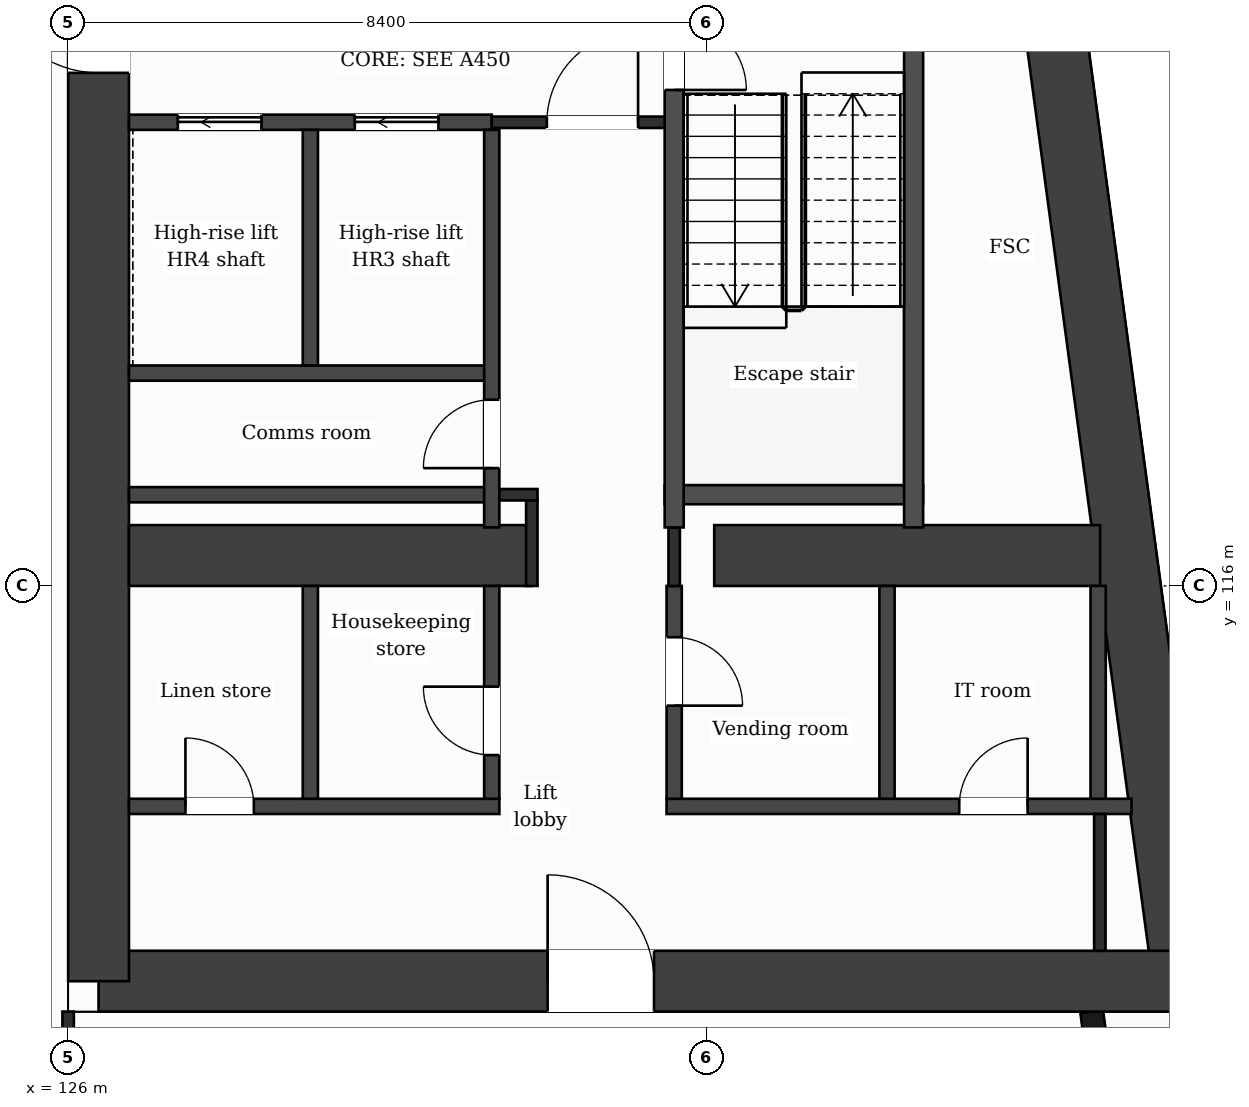
"""IFC4 building model, lengths in metres.
Left out: names, types, materials, properties, quantities, classifications, styles, units other than length and angle.
Written with IfcOpenShell. Run it as: python <this file> out.ifc"""

import sys

from ifc_helpers import new_model, si_unit, direction, frame, frame_2d, origin, place, context, subcontext, project, spatial, rectangle, extrude, element, fill, save


model = new_model("IFC4")
c1 = context("Model", 3, precision=1e-05, world=origin(), true_north=direction((0.0, 1.0)))
c2 = subcontext(c1, "Body", "Model", "MODEL_VIEW")
j1 = project(units=[si_unit("LENGTHUNIT", "METRE"), si_unit("PLANEANGLEUNIT", "RADIAN")], contexts=[c1])
p1 = place(None, origin())
s1 = spatial("IfcSite", under=j1, at=p1, CompositionType="ELEMENT")
p2 = place(p1, origin())
s2 = spatial("IfcBuilding", under=s1, at=p2, CompositionType="ELEMENT")
p3 = place(p2, frame((0.0, 0.0, 205.9)))
s3 = spatial("IfcBuildingStorey", under=s2, at=p3, CompositionType="ELEMENT", Elevation=205.9)
p4 = place(p3, frame((137.82, 132.0, 0.0), z_axis=(0.0, 0.0, 1.0), x_axis=(0.133408347329, -0.991061154956, 0.0)))
e1 = element("IfcWall", 1, at=p4, inside=s3, PredefinedType="SHEAR", context=c2, shape_type="SweptSolid", body=[
    extrude(rectangle(XDim=21.391, YDim=0.8, at=frame_2d((10.696, 0.0))), origin(), (0.0, 0.0, 1.0), 3.7),
])
p5 = place(p3, frame((140.673, 110.8, 0.0), z_axis=(0.0, 0.0, 1.0), x_axis=(-1.0, 0.0, 0.0)))
e2 = element("IfcWall", 2, at=p5, inside=s3, PredefinedType="SHEAR", context=c2, shape_type="SweptSolid", body=[
    extrude(rectangle(XDim=14.273, YDim=0.8, at=frame_2d((7.137, 0.0))), origin(), (0.0, 0.0, 1.0), 3.7),
])
p6 = place(p5, frame((6.965, 0.0, 0.0)))
e3 = element("IfcOpeningElement", 3, at=p6, cuts=e2, PredefinedType="OPENING", context=c2, shape_type="SweptSolid", body=[
    extrude(rectangle(XDim=1.4, YDim=2.1, at=frame_2d((0.7, 1.05))), frame((0.0, 0.41, 0.0), z_axis=(0.0, -1.0, 0.0), x_axis=(1.0, 0.0, 0.0)), (0.0, 0.0, 1.0), 0.82),
])
p7 = place(p3, frame((126.4, 110.8, 0.0), z_axis=(0.0, 0.0, 1.0), x_axis=(0.0, 1.0, 0.0)))
e4 = element("IfcWall", 4, at=p7, inside=s3, PredefinedType="SHEAR", context=c2, shape_type="SweptSolid", body=[
    extrude(rectangle(XDim=21.2, YDim=0.8, at=frame_2d((10.6, 0.0))), origin(), (0.0, 0.0, 1.0), 3.7),
])
p8 = place(p7, frame((11.95, 0.0, 0.0)))
e5 = element("IfcOpeningElement", 5, at=p8, cuts=e4, PredefinedType="OPENING", context=c2, shape_type="SweptSolid", body=[
    extrude(rectangle(XDim=1.4, YDim=2.1, at=frame_2d((0.7, 1.05))), frame((0.0, 0.41, 0.0), z_axis=(0.0, -1.0, 0.0), x_axis=(1.0, 0.0, 0.0)), (0.0, 0.0, 1.0), 0.82),
])
p9 = place(p3, frame((126.8, 116.4, 0.0), z_axis=(0.0, 0.0, 1.0), x_axis=(1.0, 0.0, 0.0)))
e6 = element("IfcWall", 6, at=p9, inside=s3, PredefinedType="SHEAR", context=c2, shape_type="SweptSolid", body=[
    extrude(rectangle(XDim=5.3, YDim=0.8, at=frame_2d((2.65, 0.0))), origin(), (0.0, 0.0, 1.0), 3.7),
])
p10 = place(p3, frame((134.5, 116.4, 0.0), z_axis=(0.0, 0.0, 1.0), x_axis=(1.0, 0.0, 0.0)))
e7 = element("IfcWall", 7, at=p10, inside=s3, PredefinedType="SHEAR", context=c2, shape_type="SweptSolid", body=[
    extrude(rectangle(XDim=5.077, YDim=0.8, at=frame_2d((2.539, 0.0))), origin(), (0.0, 0.0, 1.0), 3.7),
])
p11 = place(p3, frame((140.348, 103.85, 0.0), z_axis=(0.0, 0.0, 1.0), x_axis=(-0.133431549479, 0.991058031401, 0.0)))
e8 = element("IfcWall", 8, at=p11, inside=s3, PredefinedType="SOLIDWALL", context=c2, shape_type="SweptSolid", body=[
    extrude(rectangle(XDim=6.609, YDim=0.3, at=frame_2d((3.304, 0.0))), origin(), (0.0, 0.0, 1.0), 3.38),
])
p12 = place(p11, frame((0.737, 0.0, 0.9)))
e9 = element("IfcOpeningElement", 9, at=p12, cuts=e8, PredefinedType="OPENING", context=c2, shape_type="SweptSolid", body=[
    extrude(rectangle(XDim=1.2, YDim=2.1, at=frame_2d((0.6, 1.05))), frame((0.0, 0.16, 0.0), z_axis=(0.0, -1.0, 0.0), x_axis=(1.0, 0.0, 0.0)), (0.0, 0.0, 1.0), 0.32),
])
p13 = place(p11, frame((3.991, 0.0, 0.0)))
e10 = element("IfcOpeningElement", 10, at=p13, cuts=e8, PredefinedType="OPENING", context=c2, shape_type="SweptSolid", body=[
    extrude(rectangle(XDim=1.2, YDim=2.4, at=frame_2d((0.6, 1.2))), frame((0.0, 0.16, 0.0), z_axis=(0.0, -1.0, 0.0), x_axis=(1.0, 0.0, 0.0)), (0.0, 0.0, 1.0), 0.32),
])
p14 = place(p3, frame((126.8, 113.1, 0.0), z_axis=(0.0, 0.0, 1.0), x_axis=(1.0, 0.0, 0.0)))
e11 = element("IfcWall", 11, at=p14, inside=s3, PredefinedType="PARTITIONING", context=c2, shape_type="SweptSolid", body=[
    extrude(rectangle(XDim=4.873, YDim=0.2, at=frame_2d((2.437, 0.0))), origin(), (0.0, 0.0, 1.0), 3.38),
])
p15 = place(p14, frame((0.743, 0.0, 0.0)))
e12 = element("IfcOpeningElement", 12, at=p15, cuts=e11, PredefinedType="OPENING", context=c2, shape_type="SweptSolid", body=[
    extrude(rectangle(XDim=0.9, YDim=2.1, at=frame_2d((0.45, 1.05))), frame((0.0, 0.11, 0.0), z_axis=(0.0, -1.0, 0.0), x_axis=(1.0, 0.0, 0.0)), (0.0, 0.0, 1.0), 0.22),
])
p16 = place(p3, frame((133.873, 113.1, 0.0), z_axis=(0.0, 0.0, 1.0), x_axis=(1.0, 0.0, 0.0)))
e13 = element("IfcWall", 13, at=p16, inside=s3, PredefinedType="PARTITIONING", context=c2, shape_type="SweptSolid", body=[
    extrude(rectangle(XDim=6.117, YDim=0.2, at=frame_2d((3.059, 0.0))), origin(), (0.0, 0.0, 1.0), 3.38),
])
p17 = place(p16, frame((3.85, 0.0, 0.0)))
e14 = element("IfcOpeningElement", 14, at=p17, cuts=e13, PredefinedType="OPENING", context=c2, shape_type="SweptSolid", body=[
    extrude(rectangle(XDim=0.9, YDim=2.1, at=frame_2d((0.45, 1.05))), frame((0.0, 0.11, 0.0), z_axis=(0.0, -1.0, 0.0), x_axis=(1.0, 0.0, 0.0)), (0.0, 0.0, 1.0), 0.22),
])
p18 = place(p3, frame((126.8, 117.2, 0.0), z_axis=(0.0, 0.0, 1.0), x_axis=(1.0, 0.0, 0.0)))
e15 = element("IfcWall", 15, at=p18, inside=s3, PredefinedType="PARTITIONING", context=c2, shape_type="SweptSolid", body=[
    extrude(rectangle(XDim=4.773, YDim=0.2, at=frame_2d((2.386, 0.0))), origin(), (0.0, 0.0, 1.0), 3.38),
])
p19 = place(p3, frame((131.573, 117.2, 0.0), z_axis=(0.0, 0.0, 1.0), x_axis=(1.0, 0.0, 0.0)))
e16 = element("IfcWall", 16, at=p19, inside=s3, PredefinedType="PARTITIONING", context=c2, shape_type="SweptSolid", body=[
    extrude(rectangle(XDim=0.602, YDim=0.15, at=frame_2d((0.301, 0.0))), origin(), (0.0, 0.0, 1.0), 3.38),
])
p20 = place(p3, frame((133.848, 117.2, 0.0), z_axis=(0.0, 0.0, 1.0), x_axis=(1.0, 0.0, 0.0)))
e17 = element("IfcWall", 17, at=p20, inside=s3, PredefinedType="PARTITIONING", context=c2, shape_type="SweptSolid", body=[
    extrude(rectangle(XDim=3.4, YDim=0.25, at=frame_2d((1.7, 0.0))), origin(), (0.0, 0.0, 1.0), 3.38),
])
p21 = place(p3, frame((126.8, 118.8, 0.0), z_axis=(0.0, 0.0, 1.0), x_axis=(1.0, 0.0, 0.0)))
e18 = element("IfcWall", 18, at=p21, inside=s3, PredefinedType="PARTITIONING", context=c2, shape_type="SweptSolid", body=[
    extrude(rectangle(XDim=4.773, YDim=0.2, at=frame_2d((2.386, 0.0))), origin(), (0.0, 0.0, 1.0), 3.38),
])
p22 = place(p3, frame((126.8, 122.1, 0.0), z_axis=(0.0, 0.0, 1.0), x_axis=(1.0, 0.0, 0.0)))
e19 = element("IfcWall", 19, at=p22, inside=s3, PredefinedType="PARTITIONING", context=c2, shape_type="SweptSolid", body=[
    extrude(rectangle(XDim=4.773, YDim=0.2, at=frame_2d((2.386, 0.0))), origin(), (0.0, 0.0, 1.0), 3.38),
])
p23 = place(p22, frame((2.971, 0.0, 0.0)))
e20 = element("IfcOpeningElement", 20, at=p23, cuts=e19, PredefinedType="OPENING", context=c2, shape_type="SweptSolid", body=[
    extrude(rectangle(XDim=1.1, YDim=2.1, at=frame_2d((0.55, 1.05))), frame((0.0, 0.11, 0.0), z_axis=(0.0, -1.0, 0.0), x_axis=(1.0, 0.0, 0.0)), (0.0, 0.0, 1.0), 0.22),
])
p24 = place(p22, frame((0.643, 0.0, 0.0)))
e21 = element("IfcOpeningElement", 21, at=p24, cuts=e19, PredefinedType="OPENING", context=c2, shape_type="SweptSolid", body=[
    extrude(rectangle(XDim=1.1, YDim=2.1, at=frame_2d((0.55, 1.05))), frame((0.0, 0.11, 0.0), z_axis=(0.0, -1.0, 0.0), x_axis=(1.0, 0.0, 0.0)), (0.0, 0.0, 1.0), 0.22),
])
p25 = place(p3, frame((131.573, 122.1, 0.0), z_axis=(0.0, 0.0, 1.0), x_axis=(1.0, 0.0, 0.0)))
e22 = element("IfcWall", 22, at=p25, inside=s3, PredefinedType="PARTITIONING", context=c2, shape_type="SweptSolid", body=[
    extrude(rectangle(XDim=2.4, YDim=0.15, at=frame_2d((1.2, 0.0))), origin(), (0.0, 0.0, 1.0), 3.38),
])
p26 = place(p25, frame((0.725, 0.0, 0.0)))
e23 = element("IfcOpeningElement", 23, at=p26, cuts=e22, PredefinedType="OPENING", context=c2, shape_type="SweptSolid", body=[
    extrude(rectangle(XDim=1.2, YDim=2.1, at=frame_2d((0.6, 1.05))), frame((0.0, 0.085, 0.0), z_axis=(0.0, -1.0, 0.0), x_axis=(1.0, 0.0, 0.0)), (0.0, 0.0, 1.0), 0.17),
])
p27 = place(p3, frame((126.0, 109.075, 0.0), z_axis=(0.0, 0.0, 1.0), x_axis=(0.0, 1.0, 0.0)))
e24 = element("IfcWall", 24, at=p27, inside=s3, PredefinedType="PARTITIONING", context=c2, shape_type="SweptSolid", body=[
    extrude(rectangle(XDim=1.325, YDim=0.15, at=frame_2d((0.663, 0.0))), origin(), (0.0, 0.0, 1.0), 3.38),
])
p28 = place(p3, frame((129.187, 113.2, 0.0), z_axis=(0.0, 0.0, 1.0), x_axis=(0.0, 1.0, 0.0)))
e25 = element("IfcWall", 25, at=p28, inside=s3, PredefinedType="PARTITIONING", context=c2, shape_type="SweptSolid", body=[
    extrude(rectangle(XDim=2.8, YDim=0.2, at=frame_2d((1.4, 0.0))), origin(), (0.0, 0.0, 1.0), 3.38),
])
p29 = place(p3, frame((129.187, 118.9, 0.0), z_axis=(0.0, 0.0, 1.0), x_axis=(0.0, 1.0, 0.0)))
e26 = element("IfcWall", 26, at=p29, inside=s3, PredefinedType="PARTITIONING", context=c2, shape_type="SweptSolid", body=[
    extrude(rectangle(XDim=3.1, YDim=0.2, at=frame_2d((1.55, 0.0))), origin(), (0.0, 0.0, 1.0), 3.38),
])
p30 = place(p3, frame((131.573, 113.2, 0.0), z_axis=(0.0, 0.0, 1.0), x_axis=(0.0, 1.0, 0.0)))
e27 = element("IfcWall", 27, at=p30, inside=s3, PredefinedType="PARTITIONING", context=c2, shape_type="SweptSolid", body=[
    extrude(rectangle(XDim=2.8, YDim=0.2, at=frame_2d((1.4, 0.0))), origin(), (0.0, 0.0, 1.0), 3.38),
])
p31 = place(p30, frame((0.575, 0.0, 0.0)))
e28 = element("IfcOpeningElement", 28, at=p31, cuts=e27, PredefinedType="OPENING", context=c2, shape_type="SweptSolid", body=[
    extrude(rectangle(XDim=0.9, YDim=2.1, at=frame_2d((0.45, 1.05))), frame((0.0, 0.11, 0.0), z_axis=(0.0, -1.0, 0.0), x_axis=(1.0, 0.0, 0.0)), (0.0, 0.0, 1.0), 0.22),
])
p32 = place(p3, frame((131.573, 116.77, 0.0), z_axis=(0.0, 0.0, 1.0), x_axis=(0.0, 1.0, 0.0)))
e29 = element("IfcWall", 29, at=p32, inside=s3, PredefinedType="PARTITIONING", context=c2, shape_type="SweptSolid", body=[
    extrude(rectangle(XDim=5.23, YDim=0.2, at=frame_2d((2.615, 0.0))), origin(), (0.0, 0.0, 1.0), 3.38),
])
p33 = place(p32, frame((0.78, 0.0, 0.0)))
e30 = element("IfcOpeningElement", 30, at=p33, cuts=e29, PredefinedType="OPENING", context=c2, shape_type="SweptSolid", body=[
    extrude(rectangle(XDim=0.9, YDim=2.1, at=frame_2d((0.45, 1.05))), frame((0.0, 0.11, 0.0), z_axis=(0.0, -1.0, 0.0), x_axis=(1.0, 0.0, 0.0)), (0.0, 0.0, 1.0), 0.22),
])
p34 = place(p3, frame((132.1, 116.0, 0.0), z_axis=(0.0, 0.0, 1.0), x_axis=(0.0, 1.0, 0.0)))
e31 = element("IfcWall", 31, at=p34, inside=s3, PredefinedType="PARTITIONING", context=c2, shape_type="SweptSolid", body=[
    extrude(rectangle(XDim=1.125, YDim=0.15, at=frame_2d((0.562, 0.0))), origin(), (0.0, 0.0, 1.0), 3.38),
])
p35 = place(p3, frame((133.973, 113.2, 0.0), z_axis=(0.0, 0.0, 1.0), x_axis=(0.0, 1.0, 0.0)))
e32 = element("IfcWall", 32, at=p35, inside=s3, PredefinedType="PARTITIONING", context=c2, shape_type="SweptSolid", body=[
    extrude(rectangle(XDim=2.8, YDim=0.2, at=frame_2d((1.4, 0.0))), origin(), (0.0, 0.0, 1.0), 3.38),
])
p36 = place(p35, frame((1.225, 0.0, 0.0)))
e33 = element("IfcOpeningElement", 33, at=p36, cuts=e32, PredefinedType="OPENING", context=c2, shape_type="SweptSolid", body=[
    extrude(rectangle(XDim=0.9, YDim=2.1, at=frame_2d((0.45, 1.05))), frame((0.0, 0.11, 0.0), z_axis=(0.0, -1.0, 0.0), x_axis=(1.0, 0.0, 0.0)), (0.0, 0.0, 1.0), 0.22),
])
p37 = place(p3, frame((133.973, 116.0, 0.0), z_axis=(0.0, 0.0, 1.0), x_axis=(0.0, 1.0, 0.0)))
e34 = element("IfcWall", 34, at=p37, inside=s3, PredefinedType="PARTITIONING", context=c2, shape_type="SweptSolid", body=[
    extrude(rectangle(XDim=0.77, YDim=0.15, at=frame_2d((0.385, 0.0))), origin(), (0.0, 0.0, 1.0), 3.38),
])
p38 = place(p3, frame((133.973, 116.77, 0.0), z_axis=(0.0, 0.0, 1.0), x_axis=(0.0, 1.0, 0.0)))
e35 = element("IfcWall", 35, at=p38, inside=s3, PredefinedType="PARTITIONING", context=c2, shape_type="SweptSolid", body=[
    extrude(rectangle(XDim=7.055, YDim=0.25, at=frame_2d((3.527, 0.0))), origin(), (0.0, 0.0, 1.0), 3.38),
])
p39 = place(p38, frame((5.755, 0.0, 0.0)))
e36 = element("IfcOpeningElement", 36, at=p39, cuts=e35, PredefinedType="OPENING", context=c2, shape_type="SweptSolid", body=[
    extrude(rectangle(XDim=0.95, YDim=2.1, at=frame_2d((0.475, 1.05))), frame((0.0, 0.135, 0.0), z_axis=(0.0, -1.0, 0.0), x_axis=(1.0, 0.0, 0.0)), (0.0, 0.0, 1.0), 0.27),
])
p40 = place(p3, frame((136.773, 113.2, 0.0), z_axis=(0.0, 0.0, 1.0), x_axis=(0.0, 1.0, 0.0)))
e37 = element("IfcWall", 37, at=p40, inside=s3, PredefinedType="PARTITIONING", context=c2, shape_type="SweptSolid", body=[
    extrude(rectangle(XDim=2.8, YDim=0.2, at=frame_2d((1.4, 0.0))), origin(), (0.0, 0.0, 1.0), 3.38),
])
p41 = place(p3, frame((137.123, 116.77, 0.0), z_axis=(0.0, 0.0, 1.0), x_axis=(0.0, 1.0, 0.0)))
e38 = element("IfcWall", 38, at=p41, inside=s3, PredefinedType="PARTITIONING", context=c2, shape_type="SweptSolid", body=[
    extrude(rectangle(XDim=7.055, YDim=0.25, at=frame_2d((3.527, 0.0))), origin(), (0.0, 0.0, 1.0), 3.38),
])
p42 = place(p3, frame((139.551, 113.2, 0.0), z_axis=(0.0, 0.0, 1.0), x_axis=(0.0, 1.0, 0.0)))
e39 = element("IfcWall", 39, at=p42, inside=s3, PredefinedType="PARTITIONING", context=c2, shape_type="SweptSolid", body=[
    extrude(rectangle(XDim=2.8, YDim=0.2, at=frame_2d((1.4, 0.0))), origin(), (0.0, 0.0, 1.0), 3.38),
])
p43 = place(p3, frame((139.573, 111.2, 0.0), z_axis=(0.0, 0.0, 1.0), x_axis=(0.0, 1.0, 0.0)))
e40 = element("IfcWall", 40, at=p43, inside=s3, PredefinedType="PARTITIONING", context=c2, shape_type="SweptSolid", body=[
    extrude(rectangle(XDim=1.8, YDim=0.15, at=frame_2d((0.9, 0.0))), origin(), (0.0, 0.0, 1.0), 3.38),
])
p44 = place(p26, origin())
e41 = element("IfcDoor", 41, at=p44, inside=s3, OperationType="SINGLE_SWING_RIGHT", PredefinedType="DOOR", context=c2, shape_type="SweptSolid", body=[
    extrude(rectangle(XDim=1.2, YDim=2.1, at=frame_2d((0.6, 1.05))), frame((0.0, 0.025, 0.0), z_axis=(0.0, -1.0, 0.0), x_axis=(1.0, 0.0, 0.0)), (0.0, 0.0, 1.0), 0.05),
])
fill(e23, e41)
p45 = place(p23, origin())
e42 = element("IfcDoor", 42, at=p45, inside=s3, OperationType="SLIDING_TO_LEFT", PredefinedType="DOOR", context=c2, shape_type="SweptSolid", body=[
    extrude(rectangle(XDim=1.1, YDim=2.1, at=frame_2d((0.55, 1.05))), frame((0.0, 0.025, 0.0), z_axis=(0.0, -1.0, 0.0), x_axis=(1.0, 0.0, 0.0)), (0.0, 0.0, 1.0), 0.05),
])
fill(e20, e42)
p46 = place(p24, origin())
e43 = element("IfcDoor", 43, at=p46, inside=s3, OperationType="SLIDING_TO_LEFT", PredefinedType="DOOR", context=c2, shape_type="SweptSolid", body=[
    extrude(rectangle(XDim=1.1, YDim=2.1, at=frame_2d((0.55, 1.05))), frame((0.0, 0.025, 0.0), z_axis=(0.0, -1.0, 0.0), x_axis=(1.0, 0.0, 0.0)), (0.0, 0.0, 1.0), 0.05),
])
fill(e21, e43)
p47 = place(p39, origin())
e44 = element("IfcDoor", 44, at=p47, inside=s3, OperationType="SINGLE_SWING_LEFT", PredefinedType="DOOR", context=c2, shape_type="SweptSolid", body=[
    extrude(rectangle(XDim=0.95, YDim=2.1, at=frame_2d((0.475, 1.05))), frame((0.0, 0.025, 0.0), z_axis=(0.0, -1.0, 0.0), x_axis=(1.0, 0.0, 0.0)), (0.0, 0.0, 1.0), 0.05),
])
fill(e36, e44)
p48 = place(p33, origin())
e45 = element("IfcDoor", 45, at=p48, inside=s3, OperationType="SINGLE_SWING_LEFT", PredefinedType="DOOR", context=c2, shape_type="SweptSolid", body=[
    extrude(rectangle(XDim=0.9, YDim=2.1, at=frame_2d((0.45, 1.05))), frame((0.0, 0.025, 0.0), z_axis=(0.0, -1.0, 0.0), x_axis=(1.0, 0.0, 0.0)), (0.0, 0.0, 1.0), 0.05),
])
fill(e30, e45)
p49 = place(p17, origin())
e46 = element("IfcDoor", 46, at=p49, inside=s3, OperationType="SINGLE_SWING_RIGHT", PredefinedType="DOOR", context=c2, shape_type="SweptSolid", body=[
    extrude(rectangle(XDim=0.9, YDim=2.1, at=frame_2d((0.45, 1.05))), frame((0.0, 0.025, 0.0), z_axis=(0.0, -1.0, 0.0), x_axis=(1.0, 0.0, 0.0)), (0.0, 0.0, 1.0), 0.05),
])
fill(e14, e46)
p50 = place(p36, origin())
e47 = element("IfcDoor", 47, at=p50, inside=s3, OperationType="SINGLE_SWING_LEFT", PredefinedType="DOOR", context=c2, shape_type="SweptSolid", body=[
    extrude(rectangle(XDim=0.9, YDim=2.1, at=frame_2d((0.45, 1.05))), frame((0.0, 0.025, 0.0), z_axis=(0.0, -1.0, 0.0), x_axis=(1.0, 0.0, 0.0)), (0.0, 0.0, 1.0), 0.05),
])
fill(e33, e47)
p51 = place(p31, origin())
e48 = element("IfcDoor", 48, at=p51, inside=s3, OperationType="SINGLE_SWING_RIGHT", PredefinedType="DOOR", context=c2, shape_type="SweptSolid", body=[
    extrude(rectangle(XDim=0.9, YDim=2.1, at=frame_2d((0.45, 1.05))), frame((0.0, 0.025, 0.0), z_axis=(0.0, -1.0, 0.0), x_axis=(1.0, 0.0, 0.0)), (0.0, 0.0, 1.0), 0.05),
])
fill(e28, e48)
p52 = place(p15, origin())
e49 = element("IfcDoor", 49, at=p52, inside=s3, OperationType="SINGLE_SWING_LEFT", PredefinedType="DOOR", context=c2, shape_type="SweptSolid", body=[
    extrude(rectangle(XDim=0.9, YDim=2.1, at=frame_2d((0.45, 1.05))), frame((0.0, 0.025, 0.0), z_axis=(0.0, -1.0, 0.0), x_axis=(1.0, 0.0, 0.0)), (0.0, 0.0, 1.0), 0.05),
])
fill(e12, e49)
p53 = place(p6, origin())
e50 = element("IfcDoor", 50, at=p53, inside=s3, OperationType="SINGLE_SWING_RIGHT", PredefinedType="DOOR", context=c2, shape_type="SweptSolid", body=[
    extrude(rectangle(XDim=1.4, YDim=2.1, at=frame_2d((0.7, 1.05))), frame((0.0, 0.025, 0.0), z_axis=(0.0, -1.0, 0.0), x_axis=(1.0, 0.0, 0.0)), (0.0, 0.0, 1.0), 0.05),
])
fill(e3, e50)
p54 = place(p8, origin())
e51 = element("IfcDoor", 51, at=p54, inside=s3, OperationType="SINGLE_SWING_RIGHT", PredefinedType="DOOR", context=c2, shape_type="SweptSolid", body=[
    extrude(rectangle(XDim=1.4, YDim=2.1, at=frame_2d((0.7, 1.05))), frame((0.0, 0.025, 0.0), z_axis=(0.0, -1.0, 0.0), x_axis=(1.0, 0.0, 0.0)), (0.0, 0.0, 1.0), 0.05),
])
fill(e5, e51)
save(model, sys.argv[1])
